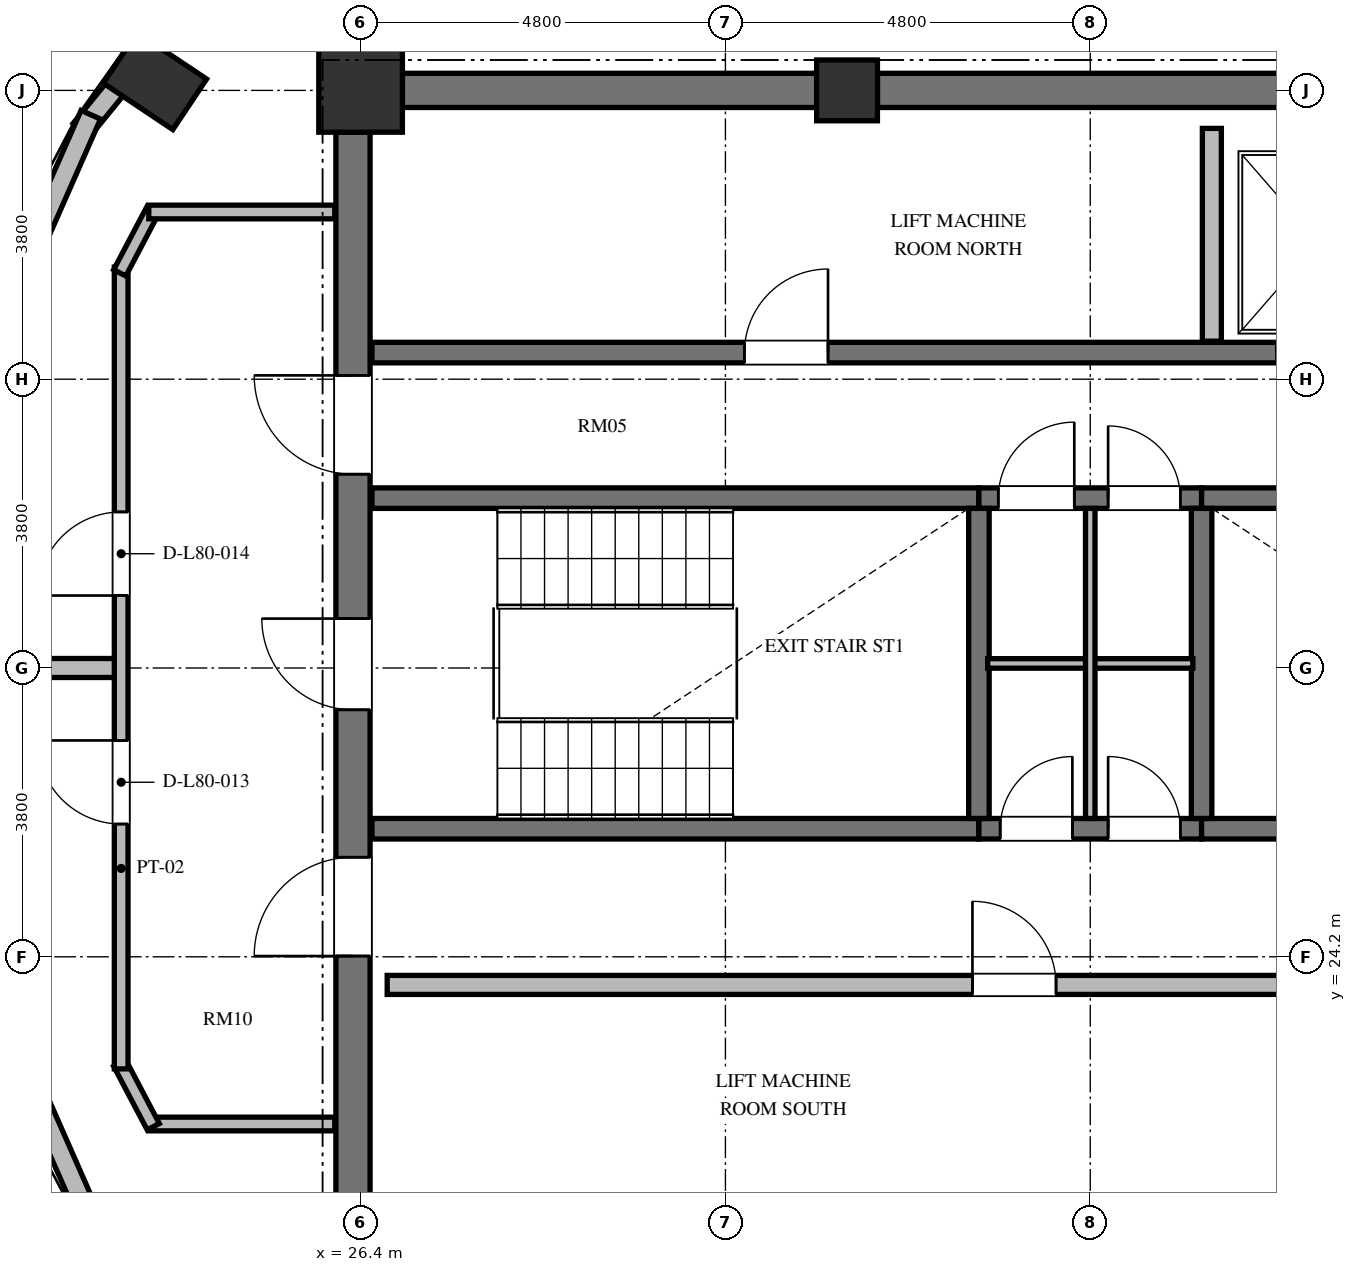
"""IFC4 building model, lengths in metres.
Left out: names, types, materials, properties, quantities, classifications, styles, units other than length and angle.
Written with IfcOpenShell. Run it as: python <this file> out.ifc"""

import sys

from ifc_helpers import new_model, si_unit, direction, frame, frame_2d, origin, origin_2d, place, context, subcontext, project, spatial, rectangle, extrude, element, fill, save


model = new_model("IFC4")
c1 = context("Model", 3, precision=1e-05, world=origin(), true_north=direction((0.0, 1.0)))
c2 = subcontext(c1, "Body", "Model", "MODEL_VIEW")
j1 = project(units=[si_unit("LENGTHUNIT", "METRE"), si_unit("PLANEANGLEUNIT", "RADIAN")], contexts=[c1])
p1 = place(None, origin())
s1 = spatial("IfcSite", under=j1, at=p1, CompositionType="ELEMENT")
p2 = place(p1, origin())
s2 = spatial("IfcBuilding", under=s1, at=p2, CompositionType="ELEMENT")
p3 = place(p2, frame((0.0, 0.0, 305.836)))
s3 = spatial("IfcBuildingStorey", under=s2, at=p3, CompositionType="ELEMENT", Elevation=305.836)
p4 = place(p3, frame((23.694, 35.722, 0.0), z_axis=(0.0, 0.0, 1.0), x_axis=(-0.831469612303, 0.55557023302, 0.0)))
e1 = element("IfcColumn", 1, at=p4, inside=s3, PredefinedType="COLUMN", context=c2, shape_type="SweptSolid", body=[
    extrude(rectangle(XDim=1.1, YDim=0.8, at=origin_2d()), origin(), (0.0, 0.0, 1.0), 3.388),
])
p5 = place(p3, frame((32.8, 35.6, 0.0), z_axis=(0.0, 0.0, 1.0), x_axis=(1.0, 0.0, 0.0)))
e2 = element("IfcColumn", 2, at=p5, inside=s3, PredefinedType="COLUMN", context=c2, shape_type="SweptSolid", body=[
    extrude(rectangle(XDim=0.8, YDim=0.8, at=origin_2d()), origin(), (0.0, 0.0, 1.0), 3.388),
])
p6 = place(p3, frame((26.4, 35.6, 0.0), z_axis=(0.0, 0.0, 1.0), x_axis=(1.0, 0.0, 0.0)))
e3 = element("IfcColumn", 3, at=p6, inside=s3, PredefinedType="COLUMN", context=c2, shape_type="SweptSolid", body=[
    extrude(rectangle(XDim=1.1, YDim=1.1, at=origin_2d()), origin(), (0.0, 0.0, 1.0), 3.388),
])
p7 = place(p3, frame((26.3, 20.95, 0.0), z_axis=(0.0, 0.0, 1.0), x_axis=(0.0, 1.0, 0.0)))
e4 = element("IfcWall", 4, at=p7, inside=s3, PredefinedType="SHEAR", context=c2, shape_type="SweptSolid", body=[
    extrude(rectangle(XDim=14.1, YDim=0.45, at=frame_2d((7.05, 0.0))), origin(), (0.0, 0.0, 1.0), 3.388),
])
p8 = place(p7, frame((6.5, 0.0, 0.0)))
e5 = element("IfcOpeningElement", 5, at=p8, cuts=e4, PredefinedType="OPENING", context=c2, shape_type="SweptSolid", body=[
    extrude(rectangle(XDim=1.2, YDim=2.15, at=frame_2d((0.6, 1.075))), frame((0.0, 0.235, 0.0), z_axis=(0.0, -1.0, 0.0), x_axis=(1.0, 0.0, 0.0)), (0.0, 0.0, 1.0), 0.47),
])
p9 = place(p7, frame((9.6, 0.0, 0.0)))
e6 = element("IfcOpeningElement", 6, at=p9, cuts=e4, PredefinedType="OPENING", context=c2, shape_type="SweptSolid", body=[
    extrude(rectangle(XDim=1.3, YDim=2.2, at=frame_2d((0.65, 1.1))), frame((0.0, 0.235, 0.0), z_axis=(0.0, -1.0, 0.0), x_axis=(1.0, 0.0, 0.0)), (0.0, 0.0, 1.0), 0.47),
])
p10 = place(p7, frame((3.26, 0.0, 0.0)))
e7 = element("IfcOpeningElement", 7, at=p10, cuts=e4, PredefinedType="OPENING", context=c2, shape_type="SweptSolid", body=[
    extrude(rectangle(XDim=1.3, YDim=2.2, at=frame_2d((0.65, 1.1))), frame((0.0, 0.235, 0.0), z_axis=(0.0, -1.0, 0.0), x_axis=(1.0, 0.0, 0.0)), (0.0, 0.0, 1.0), 0.47),
])
p11 = place(p3, frame((26.95, 35.6, 0.0), z_axis=(0.0, 0.0, 1.0), x_axis=(1.0, 0.0, 0.0)))
e8 = element("IfcWall", 8, at=p11, inside=s3, PredefinedType="SHEAR", context=c2, shape_type="SweptSolid", body=[
    extrude(rectangle(XDim=5.45, YDim=0.45, at=frame_2d((2.725, 0.0))), origin(), (0.0, 0.0, 1.0), 3.388),
])
p12 = place(p3, frame((33.2, 35.6, 0.0), z_axis=(0.0, 0.0, 1.0), x_axis=(1.0, 0.0, 0.0)))
e9 = element("IfcWall", 9, at=p12, inside=s3, PredefinedType="SHEAR", context=c2, shape_type="SweptSolid", body=[
    extrude(rectangle(XDim=5.6, YDim=0.45, at=frame_2d((2.8, 0.0))), origin(), (0.0, 0.0, 1.0), 3.388),
])
p13 = place(p3, frame((25.3, 38.233, 0.0), z_axis=(0.0, 0.0, 1.0), x_axis=(-0.631957150792, -0.775003328743, 0.0)))
e10 = element("IfcWall", 10, at=p13, inside=s3, PredefinedType="SOLIDWALL", context=c2, shape_type="SweptSolid", body=[
    extrude(rectangle(XDim=4.072, YDim=0.28, at=frame_2d((2.036, 0.0))), origin(), (0.0, 0.0, 1.0), 3.068),
])
for number, where, z_axis, x_axis in (
    (11, (22.85, 35.28, 0.0), (0.0, 0.0, 1.0), (-0.403, -0.915, 0.0)),
    (12, (21.231, 24.398, 0.0), (0.0, 0.0, 1.0), (0.403, -0.915, 0.0)),
):
    element("IfcWall", number, at=place(p3, frame(where, z_axis=z_axis, x_axis=x_axis)), inside=s3, PredefinedType="SOLIDWALL", context=c2, shape_type="SweptSolid", body=[
        extrude(rectangle(XDim=4.019, YDim=0.28, at=frame_2d((2.009, 0.0))), origin(), (0.0, 0.0, 1.0), 3.068),
    ])
p14 = place(p3, frame((26.55, 30.235, 0.0), z_axis=(0.0, 0.0, 1.0), x_axis=(1.0, 0.0, 0.0)))
e13 = element("IfcWall", 13, at=p14, inside=s3, PredefinedType="SHEAR", context=c2, shape_type="SweptSolid", body=[
    extrude(rectangle(XDim=7.985, YDim=0.27, at=frame_2d((3.992, 0.0))), origin(), (0.0, 0.0, 1.0), 3.388),
])
p15 = place(p3, frame((34.535, 30.235, 0.0), z_axis=(0.0, 0.0, 1.0), x_axis=(1.0, 0.0, 0.0)))
e14 = element("IfcWall", 14, at=p15, inside=s3, PredefinedType="SHEAR", context=c2, shape_type="SweptSolid", body=[
    extrude(rectangle(XDim=2.93, YDim=0.27, at=frame_2d((1.465, 0.0))), origin(), (0.0, 0.0, 1.0), 3.388),
])
p16 = place(p15, frame((0.255, 0.0, 0.0)))
e15 = element("IfcOpeningElement", 15, at=p16, cuts=e14, PredefinedType="OPENING", context=c2, shape_type="SweptSolid", body=[
    extrude(rectangle(XDim=1.0, YDim=2.1, at=frame_2d((0.5, 1.05))), frame((0.0, 0.145, 0.0), z_axis=(0.0, -1.0, 0.0), x_axis=(1.0, 0.0, 0.0)), (0.0, 0.0, 1.0), 0.29),
])
p17 = place(p15, frame((1.7, 0.0, 0.0)))
e16 = element("IfcOpeningElement", 16, at=p17, cuts=e14, PredefinedType="OPENING", context=c2, shape_type="SweptSolid", body=[
    extrude(rectangle(XDim=0.95, YDim=2.1, at=frame_2d((0.475, 1.05))), frame((0.0, 0.145, 0.0), z_axis=(0.0, -1.0, 0.0), x_axis=(1.0, 0.0, 0.0)), (0.0, 0.0, 1.0), 0.29),
])
p18 = place(p3, frame((37.465, 30.235, 0.0), z_axis=(0.0, 0.0, 1.0), x_axis=(1.0, 0.0, 0.0)))
e17 = element("IfcWall", 17, at=p18, inside=s3, PredefinedType="SHEAR", context=c2, shape_type="SweptSolid", body=[
    extrude(rectangle(XDim=7.985, YDim=0.27, at=frame_2d((3.992, 0.0))), origin(), (0.0, 0.0, 1.0), 3.388),
])
p19 = place(p18, frame((6.455, 0.0, 0.0)))
e18 = element("IfcOpeningElement", 18, at=p19, cuts=e17, PredefinedType="OPENING", context=c2, shape_type="SweptSolid", body=[
    extrude(rectangle(XDim=1.2, YDim=2.15, at=frame_2d((0.6, 1.075))), frame((0.0, 0.145, 0.0), z_axis=(0.0, -1.0, 0.0), x_axis=(1.0, 0.0, 0.0)), (0.0, 0.0, 1.0), 0.29),
])
p20 = place(p3, frame((26.55, 25.885, 0.0), z_axis=(0.0, 0.0, 1.0), x_axis=(1.0, 0.0, 0.0)))
e19 = element("IfcWall", 19, at=p20, inside=s3, PredefinedType="SHEAR", context=c2, shape_type="SweptSolid", body=[
    extrude(rectangle(XDim=7.985, YDim=0.27, at=frame_2d((3.992, 0.0))), origin(), (0.0, 0.0, 1.0), 3.388),
])
p21 = place(p3, frame((34.535, 25.885, 0.0), z_axis=(0.0, 0.0, 1.0), x_axis=(1.0, 0.0, 0.0)))
e20 = element("IfcWall", 20, at=p21, inside=s3, PredefinedType="SHEAR", context=c2, shape_type="SweptSolid", body=[
    extrude(rectangle(XDim=2.93, YDim=0.27, at=frame_2d((1.465, 0.0))), origin(), (0.0, 0.0, 1.0), 3.388),
])
p22 = place(p21, frame((0.28, 0.0, 0.0)))
e21 = element("IfcOpeningElement", 21, at=p22, cuts=e20, PredefinedType="OPENING", context=c2, shape_type="SweptSolid", body=[
    extrude(rectangle(XDim=0.95, YDim=2.1, at=frame_2d((0.475, 1.05))), frame((0.0, 0.145, 0.0), z_axis=(0.0, -1.0, 0.0), x_axis=(1.0, 0.0, 0.0)), (0.0, 0.0, 1.0), 0.29),
])
p23 = place(p21, frame((1.7, 0.0, 0.0)))
e22 = element("IfcOpeningElement", 22, at=p23, cuts=e20, PredefinedType="OPENING", context=c2, shape_type="SweptSolid", body=[
    extrude(rectangle(XDim=0.95, YDim=2.1, at=frame_2d((0.475, 1.05))), frame((0.0, 0.145, 0.0), z_axis=(0.0, -1.0, 0.0), x_axis=(1.0, 0.0, 0.0)), (0.0, 0.0, 1.0), 0.29),
])
p24 = place(p3, frame((37.465, 25.885, 0.0), z_axis=(0.0, 0.0, 1.0), x_axis=(1.0, 0.0, 0.0)))
e23 = element("IfcWall", 23, at=p24, inside=s3, PredefinedType="SHEAR", context=c2, shape_type="SweptSolid", body=[
    extrude(rectangle(XDim=7.985, YDim=0.27, at=frame_2d((3.992, 0.0))), origin(), (0.0, 0.0, 1.0), 3.388),
])
for number, where, z_axis, x_axis in (
    (24, (34.535, 26.02, 0.0), (0.0, 0.0, 1.0), (0.0, 1.0, 0.0)),
    (25, (37.465, 26.02, 0.0), (0.0, 0.0, 1.0), (0.0, 1.0, 0.0)),
):
    element("IfcWall", number, at=place(p3, frame(where, z_axis=z_axis, x_axis=x_axis)), inside=s3, PredefinedType="SHEAR", context=c2, shape_type="SweptSolid", body=[
        extrude(rectangle(XDim=4.08, YDim=0.27, at=frame_2d((2.04, 0.0))), origin(), (0.0, 0.0, 1.0), 3.388),
    ])
p25 = place(p3, frame((34.65, 28.06, 0.0), z_axis=(0.0, 0.0, 1.0), x_axis=(1.0, 0.0, 0.0)))
e26 = element("IfcWall", 26, at=p25, inside=s3, PredefinedType="PARTITIONING", context=c2, shape_type="SweptSolid", body=[
    extrude(rectangle(XDim=2.7, YDim=0.125, at=frame_2d((1.35, 0.0))), origin(), (0.0, 0.0, 1.0), 3.068),
])
p26 = place(p3, frame((36.0, 26.02, 0.0), z_axis=(0.0, 0.0, 1.0), x_axis=(0.0, 1.0, 0.0)))
e27 = element("IfcWall", 27, at=p26, inside=s3, PredefinedType="PARTITIONING", context=c2, shape_type="SweptSolid", body=[
    extrude(rectangle(XDim=4.08, YDim=0.125, at=frame_2d((2.04, 0.0))), origin(), (0.0, 0.0, 1.0), 3.068),
])
p27 = place(p3, frame((26.55, 32.15, 0.0), z_axis=(0.0, 0.0, 1.0), x_axis=(1.0, 0.0, 0.0)))
e28 = element("IfcWall", 28, at=p27, inside=s3, PredefinedType="SHEAR", context=c2, shape_type="SweptSolid", body=[
    extrude(rectangle(XDim=16.4, YDim=0.27, at=frame_2d((8.2, 0.0))), origin(), (0.0, 0.0, 1.0), 3.388),
])
p28 = place(p27, frame((4.9, 0.0, 0.0)))
e29 = element("IfcOpeningElement", 29, at=p28, cuts=e28, PredefinedType="OPENING", context=c2, shape_type="SweptSolid", body=[
    extrude(rectangle(XDim=1.1, YDim=2.15, at=frame_2d((0.55, 1.075))), frame((0.0, 0.145, 0.0), z_axis=(0.0, -1.0, 0.0), x_axis=(1.0, 0.0, 0.0)), (0.0, 0.0, 1.0), 0.29),
])
p29 = place(p27, frame((11.9, 0.0, 0.0)))
e30 = element("IfcOpeningElement", 30, at=p29, cuts=e28, PredefinedType="OPENING", context=c2, shape_type="SweptSolid", body=[
    extrude(rectangle(XDim=1.1, YDim=2.2, at=frame_2d((0.55, 1.1))), frame((0.0, 0.145, 0.0), z_axis=(0.0, -1.0, 0.0), x_axis=(1.0, 0.0, 0.0)), (0.0, 0.0, 1.0), 0.29),
])
p30 = place(p3, frame((26.75, 23.83, 0.0), z_axis=(0.0, 0.0, 1.0), x_axis=(1.0, 0.0, 0.0)))
e31 = element("IfcWall", 31, at=p30, inside=s3, PredefinedType="SOLIDWALL", context=c2, shape_type="SweptSolid", body=[
    extrude(rectangle(XDim=16.2, YDim=0.25, at=frame_2d((8.1, 0.0))), origin(), (0.0, 0.0, 1.0), 3.068),
])
p31 = place(p30, frame((7.7, 0.0, 0.0)))
e32 = element("IfcOpeningElement", 32, at=p31, cuts=e31, PredefinedType="OPENING", context=c2, shape_type="SweptSolid", body=[
    extrude(rectangle(XDim=1.1, YDim=2.15, at=frame_2d((0.55, 1.075))), frame((0.0, 0.135, 0.0), z_axis=(0.0, -1.0, 0.0), x_axis=(1.0, 0.0, 0.0)), (0.0, 0.0, 1.0), 0.27),
])
p32 = place(p3, frame((37.6, 32.3, 0.0), z_axis=(0.0, 0.0, 1.0), x_axis=(0.0, 1.0, 0.0)))
e33 = element("IfcWall", 33, at=p32, inside=s3, PredefinedType="SOLIDWALL", context=c2, shape_type="SweptSolid", body=[
    extrude(rectangle(XDim=2.8, YDim=0.25, at=frame_2d((1.4, 0.0))), origin(), (0.0, 0.0, 1.0), 3.068),
])
p33 = place(p3, frame((26.06, 22.0, 0.0), z_axis=(0.0, 0.0, 1.0), x_axis=(-1.0, 0.0, 0.0)))
e34 = element("IfcWall", 34, at=p33, inside=s3, PredefinedType="PARTITIONING", context=c2, shape_type="SweptSolid", body=[
    extrude(rectangle(XDim=2.447, YDim=0.18, at=frame_2d((1.223, 0.0))), origin(), (0.0, 0.0, 1.0), 3.068),
])
p34 = place(p3, frame((23.672, 21.965, 0.0), z_axis=(0.0, 0.0, 1.0), x_axis=(-0.466427533163, 0.884559413667, 0.0)))
e35 = element("IfcWall", 35, at=p34, inside=s3, PredefinedType="PARTITIONING", context=c2, shape_type="SweptSolid", body=[
    extrude(rectangle(XDim=0.945, YDim=0.18, at=frame_2d((0.473, 0.0))), origin(), (0.0, 0.0, 1.0), 3.068),
])
p35 = place(p3, frame((23.25, 22.725, 0.0), z_axis=(0.0, 0.0, 1.0), x_axis=(0.0, 1.0, 0.0)))
e36 = element("IfcWall", 36, at=p35, inside=s3, PredefinedType="PARTITIONING", context=c2, shape_type="SweptSolid", body=[
    extrude(rectangle(XDim=10.549, YDim=0.18, at=frame_2d((5.275, 0.0))), origin(), (0.0, 0.0, 1.0), 3.068),
])
p36 = place(p35, frame((3.221, 0.0, 0.0)))
e37 = element("IfcOpeningElement", 37, at=p36, cuts=e36, PredefinedType="OPENING", context=c2, shape_type="SweptSolid", body=[
    extrude(rectangle(XDim=1.1, YDim=2.15, at=frame_2d((0.55, 1.075))), frame((0.0, 0.1, 0.0), z_axis=(0.0, -1.0, 0.0), x_axis=(1.0, 0.0, 0.0)), (0.0, 0.0, 1.0), 0.2),
])
p37 = place(p35, frame((6.228, 0.0, 0.0)))
e38 = element("IfcOpeningElement", 38, at=p37, cuts=e36, PredefinedType="OPENING", context=c2, shape_type="SweptSolid", body=[
    extrude(rectangle(XDim=1.1, YDim=2.15, at=frame_2d((0.55, 1.075))), frame((0.0, 0.1, 0.0), z_axis=(0.0, -1.0, 0.0), x_axis=(1.0, 0.0, 0.0)), (0.0, 0.0, 1.0), 0.2),
])
p38 = place(p3, frame((23.231, 33.199, 0.0), z_axis=(0.0, 0.0, 1.0), x_axis=(0.466427533163, 0.884559413667, 0.0)))
e39 = element("IfcWall", 39, at=p38, inside=s3, PredefinedType="PARTITIONING", context=c2, shape_type="SweptSolid", body=[
    extrude(rectangle(XDim=0.945, YDim=0.18, at=frame_2d((0.473, 0.0))), origin(), (0.0, 0.0, 1.0), 3.068),
])
p39 = place(p3, frame((23.614, 34.0, 0.0), z_axis=(0.0, 0.0, 1.0), x_axis=(1.0, 0.0, 0.0)))
e40 = element("IfcWall", 40, at=p39, inside=s3, PredefinedType="PARTITIONING", context=c2, shape_type="SweptSolid", body=[
    extrude(rectangle(XDim=2.447, YDim=0.18, at=frame_2d((1.223, 0.0))), origin(), (0.0, 0.0, 1.0), 3.068),
])
p40 = place(p3, frame((20.795, 28.0, 0.0), z_axis=(0.0, 0.0, 1.0), x_axis=(1.0, 0.0, 0.0)))
e41 = element("IfcWall", 41, at=p40, inside=s3, PredefinedType="SOLIDWALL", context=c2, shape_type="SweptSolid", body=[
    extrude(rectangle(XDim=2.365, YDim=0.25, at=frame_2d((1.183, 0.0))), origin(), (0.0, 0.0, 1.0), 3.068),
])
p41 = place(p8, origin())
e42 = element("IfcDoor", 42, at=p41, inside=s3, OperationType="SINGLE_SWING_RIGHT", PredefinedType="DOOR", context=c2, shape_type="SweptSolid", body=[
    extrude(rectangle(XDim=1.2, YDim=2.15, at=frame_2d((0.6, 1.075))), frame((0.0, 0.025, 0.0), z_axis=(0.0, -1.0, 0.0), x_axis=(1.0, 0.0, 0.0)), (0.0, 0.0, 1.0), 0.05),
])
fill(e5, e42)
p42 = place(p22, origin())
e43 = element("IfcDoor", 43, at=p42, inside=s3, OperationType="SINGLE_SWING_RIGHT", PredefinedType="DOOR", context=c2, shape_type="SweptSolid", body=[
    extrude(rectangle(XDim=0.95, YDim=2.1, at=frame_2d((0.475, 1.05))), frame((0.0, 0.025, 0.0), z_axis=(0.0, -1.0, 0.0), x_axis=(1.0, 0.0, 0.0)), (0.0, 0.0, 1.0), 0.05),
])
fill(e21, e43)
p43 = place(p23, origin())
e44 = element("IfcDoor", 44, at=p43, inside=s3, OperationType="SINGLE_SWING_LEFT", PredefinedType="DOOR", context=c2, shape_type="SweptSolid", body=[
    extrude(rectangle(XDim=0.95, YDim=2.1, at=frame_2d((0.475, 1.05))), frame((0.0, 0.025, 0.0), z_axis=(0.0, -1.0, 0.0), x_axis=(1.0, 0.0, 0.0)), (0.0, 0.0, 1.0), 0.05),
])
fill(e22, e44)
p44 = place(p16, origin())
e45 = element("IfcDoor", 45, at=p44, inside=s3, OperationType="SINGLE_SWING_RIGHT", PredefinedType="DOOR", context=c2, shape_type="SweptSolid", body=[
    extrude(rectangle(XDim=1.0, YDim=2.1, at=frame_2d((0.5, 1.05))), frame((0.0, 0.025, 0.0), z_axis=(0.0, -1.0, 0.0), x_axis=(1.0, 0.0, 0.0)), (0.0, 0.0, 1.0), 0.05),
])
fill(e15, e45)
p45 = place(p17, origin())
e46 = element("IfcDoor", 46, at=p45, inside=s3, OperationType="SINGLE_SWING_LEFT", PredefinedType="DOOR", context=c2, shape_type="SweptSolid", body=[
    extrude(rectangle(XDim=0.95, YDim=2.1, at=frame_2d((0.475, 1.05))), frame((0.0, 0.025, 0.0), z_axis=(0.0, -1.0, 0.0), x_axis=(1.0, 0.0, 0.0)), (0.0, 0.0, 1.0), 0.05),
])
fill(e16, e46)
p46 = place(p9, origin())
e47 = element("IfcDoor", 47, at=p46, inside=s3, OperationType="SINGLE_SWING_RIGHT", PredefinedType="DOOR", context=c2, shape_type="SweptSolid", body=[
    extrude(rectangle(XDim=1.3, YDim=2.2, at=frame_2d((0.65, 1.1))), frame((0.0, 0.025, 0.0), z_axis=(0.0, -1.0, 0.0), x_axis=(1.0, 0.0, 0.0)), (0.0, 0.0, 1.0), 0.05),
])
fill(e6, e47)
p47 = place(p10, origin())
e48 = element("IfcDoor", 48, at=p47, inside=s3, OperationType="SINGLE_SWING_LEFT", PredefinedType="DOOR", context=c2, shape_type="SweptSolid", body=[
    extrude(rectangle(XDim=1.3, YDim=2.2, at=frame_2d((0.65, 1.1))), frame((0.0, 0.025, 0.0), z_axis=(0.0, -1.0, 0.0), x_axis=(1.0, 0.0, 0.0)), (0.0, 0.0, 1.0), 0.05),
])
fill(e7, e48)
p48 = place(p28, origin())
e49 = element("IfcDoor", 49, at=p48, inside=s3, OperationType="SINGLE_SWING_RIGHT", PredefinedType="DOOR", context=c2, shape_type="SweptSolid", body=[
    extrude(rectangle(XDim=1.1, YDim=2.15, at=frame_2d((0.55, 1.075))), frame((0.0, 0.025, 0.0), z_axis=(0.0, -1.0, 0.0), x_axis=(1.0, 0.0, 0.0)), (0.0, 0.0, 1.0), 0.05),
])
fill(e29, e49)
p49 = place(p31, origin())
e50 = element("IfcDoor", 50, at=p49, inside=s3, OperationType="SINGLE_SWING_LEFT", PredefinedType="DOOR", context=c2, shape_type="SweptSolid", body=[
    extrude(rectangle(XDim=1.1, YDim=2.15, at=frame_2d((0.55, 1.075))), frame((0.0, 0.025, 0.0), z_axis=(0.0, -1.0, 0.0), x_axis=(1.0, 0.0, 0.0)), (0.0, 0.0, 1.0), 0.05),
])
fill(e32, e50)
p50 = place(p36, origin())
e51 = element("IfcDoor", 51, at=p50, inside=s3, OperationType="SINGLE_SWING_RIGHT", PredefinedType="DOOR", context=c2, shape_type="SweptSolid", body=[
    extrude(rectangle(XDim=1.1, YDim=2.15, at=frame_2d((0.55, 1.075))), frame((0.0, 0.025, 0.0), z_axis=(0.0, -1.0, 0.0), x_axis=(1.0, 0.0, 0.0)), (0.0, 0.0, 1.0), 0.05),
])
fill(e37, e51)
p51 = place(p37, origin())
e52 = element("IfcDoor", 52, at=p51, inside=s3, OperationType="SINGLE_SWING_LEFT", PredefinedType="DOOR", context=c2, shape_type="SweptSolid", body=[
    extrude(rectangle(XDim=1.1, YDim=2.15, at=frame_2d((0.55, 1.075))), frame((0.0, 0.025, 0.0), z_axis=(0.0, -1.0, 0.0), x_axis=(1.0, 0.0, 0.0)), (0.0, 0.0, 1.0), 0.05),
])
fill(e38, e52)
save(model, sys.argv[1])
